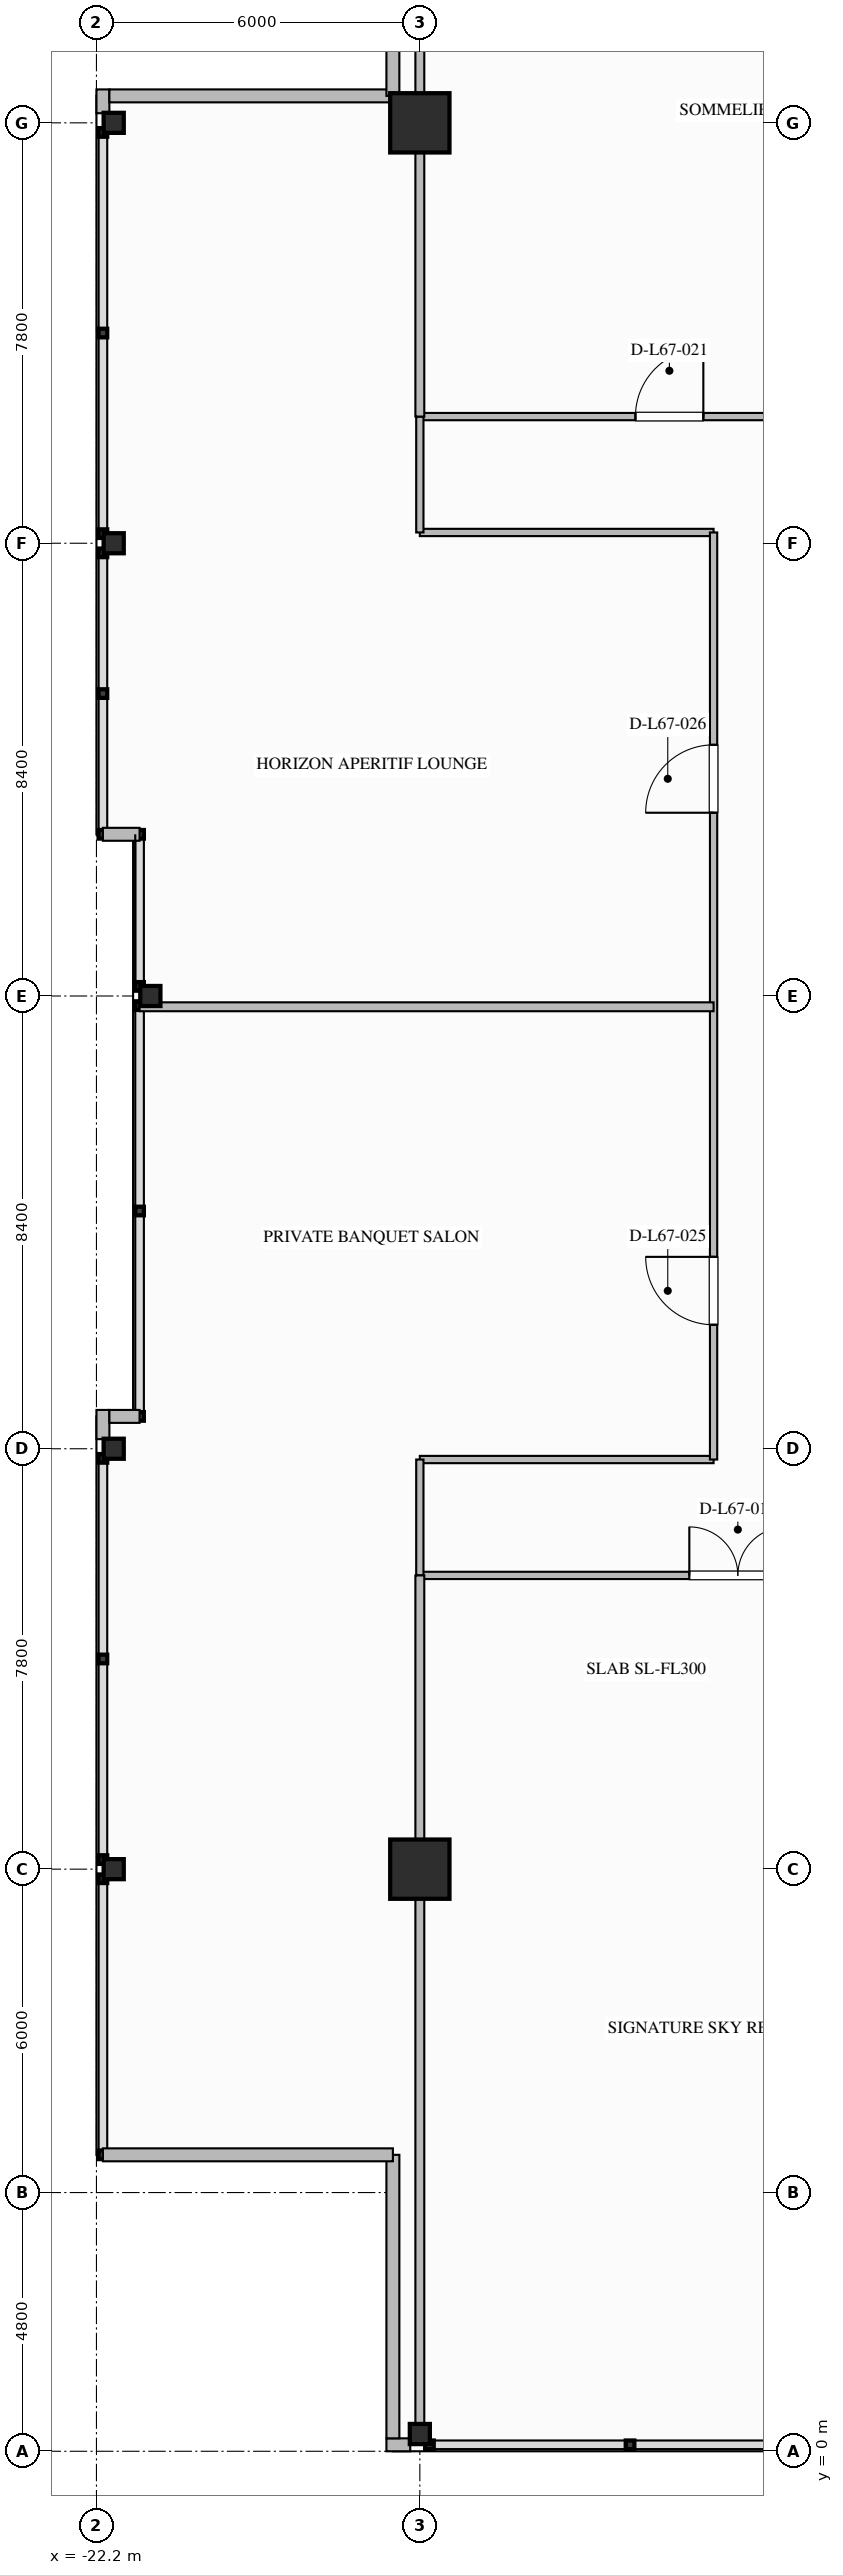
"""IFC4 building model, lengths in metres.
Left out: names, types, materials, properties, quantities, classifications, styles, units other than length and angle.
Written with IfcOpenShell. Run it as: python <this file> out.ifc"""

import sys

from ifc_helpers import new_model, si_unit, direction, frame, frame_2d, origin, origin_2d, place, context, subcontext, project, spatial, rectangle, i_section, extrude, element, fill, save


model = new_model("IFC4")
c1 = context("Model", 3, precision=1e-05, world=origin(), true_north=direction((0.0, 1.0)))
c2 = subcontext(c1, "Body", "Model", "MODEL_VIEW")
j1 = project(units=[si_unit("LENGTHUNIT", "METRE"), si_unit("PLANEANGLEUNIT", "RADIAN")], contexts=[c1])
p1 = place(None, origin())
s1 = spatial("IfcSite", under=j1, at=p1, CompositionType="ELEMENT")
p2 = place(p1, origin())
s2 = spatial("IfcBuilding", under=s1, at=p2, CompositionType="ELEMENT")
p3 = place(p2, frame((0.0, 0.0, 255.5)))
s3 = spatial("IfcBuildingStorey", under=s2, at=p3, CompositionType="ELEMENT", Elevation=255.5)
for number, where, z_axis, x_axis in (
    (1, (-16.2, 10.8, 0.0), (0.0, 0.0, 1.0), (1.0, 0.0, 0.0)),
    (2, (-16.2, 43.2, 0.0), (0.0, 0.0, 1.0), (1.0, 0.0, 0.0)),
):
    element("IfcColumn", number, at=place(p3, frame(where, z_axis=z_axis, x_axis=x_axis)), inside=s3, PredefinedType="COLUMN", context=c2, shape_type="SweptSolid", body=[
        extrude(rectangle(XDim=1.1, YDim=1.1, at=origin_2d()), origin(), (0.0, 0.0, 1.0), 4.5),
    ])
for number, where, z_axis, x_axis in (
    (3, (-21.88, 10.8, 0.0), (0.0, 0.0, 1.0), (1.0, 0.0, 0.0)),
    (4, (-21.88, 18.6, 0.0), (0.0, 0.0, 1.0), (1.0, 0.0, 0.0)),
    (5, (-21.2, 27.0, 0.0), (0.0, 0.0, 1.0), (1.0, 0.0, 0.0)),
    (6, (-21.88, 35.4, 0.0), (0.0, 0.0, 1.0), (1.0, 0.0, 0.0)),
    (7, (-21.88, 43.2, 0.0), (0.0, 0.0, 1.0), (1.0, 0.0, 0.0)),
    (8, (-16.2, 0.32, 0.0), (0.0, 0.0, 1.0), (0.0, 1.0, 0.0)),
):
    element("IfcColumn", number, at=place(p3, frame(where, z_axis=z_axis, x_axis=x_axis)), inside=s3, PredefinedType="COLUMN", context=c2, shape_type="SweptSolid", body=[
        extrude(i_section(OverallWidth=0.374, OverallDepth=0.372, WebThickness=0.016, FlangeThickness=0.026, FilletRadius=0.025, at=origin_2d()), origin(), (0.0, 0.0, 1.0), 4.497),
    ])
p4 = place(p3, frame((-22.08, 18.778, 0.0), z_axis=(0.0, 0.0, 1.0), x_axis=(0.0, 1.0, 0.0)))
e9 = element("IfcWall", 9, at=p4, inside=s3, PredefinedType="STANDARD", context=c2, shape_type="SweptSolid", body=[
    extrude(rectangle(XDim=0.542, YDim=0.24, at=frame_2d((0.271, 0.0))), origin(), (0.0, 0.0, 1.0), 4.18),
])
for number, where, z_axis, x_axis in (
    (10, (-22.08, 43.378, 0.0), (0.0, 0.0, 1.0), (0.0, 1.0, 0.0)),
    (11, (-16.378, 0.12, 0.0), (0.0, 0.0, 1.0), (-1.0, 0.0, 0.0)),
):
    element("IfcWall", number, at=place(p3, frame(where, z_axis=z_axis, x_axis=x_axis)), inside=s3, PredefinedType="STANDARD", context=c2, shape_type="SweptSolid", body=[
        extrude(rectangle(XDim=0.442, YDim=0.24, at=frame_2d((0.221, 0.0))), origin(), (0.0, 0.0, 1.0), 4.18),
    ])
p5 = place(p3, frame((-16.7, 0.24, 0.0), z_axis=(0.0, 0.0, 1.0), x_axis=(0.0, 1.0, 0.0)))
e12 = element("IfcWall", 12, at=p5, inside=s3, PredefinedType="STANDARD", context=c2, shape_type="SweptSolid", body=[
    extrude(rectangle(XDim=5.26, YDim=0.24, at=frame_2d((2.63, 0.0))), origin(), (0.0, 0.0, 1.0), 4.18),
])
p6 = place(p3, frame((-16.7, 5.5, 0.0), z_axis=(0.0, 0.0, 1.0), x_axis=(-1.0, 0.0, 0.0)))
e13 = element("IfcWall", 13, at=p6, inside=s3, PredefinedType="STANDARD", context=c2, shape_type="SweptSolid", body=[
    extrude(rectangle(XDim=5.38, YDim=0.24, at=frame_2d((2.69, 0.0))), origin(), (0.0, 0.0, 1.0), 4.18),
])
for number, where, z_axis, x_axis in (
    (14, (-21.96, 43.7, 0.0), (0.0, 0.0, 1.0), (1.0, 0.0, 0.0)),
    (15, (-16.7, 43.7, 0.0), (0.0, 0.0, 1.0), (0.0, 1.0, 0.0)),
):
    element("IfcWall", number, at=place(p3, frame(where, z_axis=z_axis, x_axis=x_axis)), inside=s3, PredefinedType="STANDARD", context=c2, shape_type="SweptSolid", body=[
        extrude(rectangle(XDim=5.26, YDim=0.24, at=frame_2d((2.63, 0.0))), origin(), (0.0, 0.0, 1.0), 4.18),
    ])
p7 = place(p3, frame((-21.96, 19.2, 0.0), z_axis=(0.0, 0.0, 1.0), x_axis=(1.0, 0.0, 0.0)))
e16 = element("IfcWall", 16, at=p7, inside=s3, PredefinedType="STANDARD", context=c2, shape_type="SweptSolid", body=[
    extrude(rectangle(XDim=0.56, YDim=0.24, at=frame_2d((0.28, 0.0))), origin(), (0.0, 0.0, 1.0), 4.18),
])
p8 = place(p3, frame((-21.4, 30.0, 0.0), z_axis=(0.0, 0.0, 1.0), x_axis=(-1.0, 0.0, 0.0)))
e17 = element("IfcWall", 17, at=p8, inside=s3, PredefinedType="STANDARD", context=c2, shape_type="SweptSolid", body=[
    extrude(rectangle(XDim=0.68, YDim=0.24, at=frame_2d((0.34, 0.0))), origin(), (0.0, 0.0, 1.0), 4.18),
])
p9 = place(p3, frame((-16.2, 16.25, 0.0), z_axis=(0.0, 0.0, 1.0), x_axis=(1.0, 0.0, 0.0)))
e18 = element("IfcWall", 18, at=p9, inside=s3, PredefinedType="PARTITIONING", context=c2, shape_type="SweptSolid", body=[
    extrude(rectangle(XDim=32.4, YDim=0.135, at=frame_2d((16.2, 0.0))), origin(), (0.0, 0.0, 1.0), 4.18),
])
p10 = place(p9, frame((5.0, 0.0, 0.0)))
e19 = element("IfcOpeningElement", 19, at=p10, cuts=e18, PredefinedType="OPENING", context=c2, shape_type="SweptSolid", body=[
    extrude(rectangle(XDim=1.8, YDim=2.35, at=frame_2d((0.9, 1.175))), frame((0.0, 0.077, 0.0), z_axis=(0.0, -1.0, 0.0), x_axis=(1.0, 0.0, 0.0)), (0.0, 0.0, 1.0), 0.155),
])
p11 = place(p9, frame((23.0, 0.0, 0.0)))
e20 = element("IfcOpeningElement", 20, at=p11, cuts=e18, PredefinedType="OPENING", context=c2, shape_type="SweptSolid", body=[
    extrude(rectangle(XDim=1.8, YDim=2.35, at=frame_2d((0.9, 1.175))), frame((0.0, 0.077, 0.0), z_axis=(0.0, -1.0, 0.0), x_axis=(1.0, 0.0, 0.0)), (0.0, 0.0, 1.0), 0.155),
])
p12 = place(p3, frame((-16.2, 37.75, 0.0), z_axis=(0.0, 0.0, 1.0), x_axis=(1.0, 0.0, 0.0)))
e21 = element("IfcWall", 21, at=p12, inside=s3, PredefinedType="PARTITIONING", context=c2, shape_type="SweptSolid", body=[
    extrude(rectangle(XDim=32.4, YDim=0.135, at=frame_2d((16.2, 0.0))), origin(), (0.0, 0.0, 1.0), 4.18),
])
p13 = place(p12, frame((4.0, 0.0, 0.0)))
e22 = element("IfcOpeningElement", 22, at=p13, cuts=e21, PredefinedType="OPENING", context=c2, shape_type="SweptSolid", body=[
    extrude(rectangle(XDim=1.26, YDim=2.2, at=frame_2d((0.63, 1.1))), frame((0.0, 0.077, 0.0), z_axis=(0.0, -1.0, 0.0), x_axis=(1.0, 0.0, 0.0)), (0.0, 0.0, 1.0), 0.155),
])
p14 = place(p12, frame((16.9, 0.0, 0.0)))
e23 = element("IfcOpeningElement", 23, at=p14, cuts=e21, PredefinedType="OPENING", context=c2, shape_type="SweptSolid", body=[
    extrude(rectangle(XDim=1.26, YDim=2.2, at=frame_2d((0.63, 1.1))), frame((0.0, 0.077, 0.0), z_axis=(0.0, -1.0, 0.0), x_axis=(1.0, 0.0, 0.0)), (0.0, 0.0, 1.0), 0.155),
])
p15 = place(p12, frame((25.5, 0.0, 0.0)))
e24 = element("IfcOpeningElement", 24, at=p15, cuts=e21, PredefinedType="OPENING", context=c2, shape_type="SweptSolid", body=[
    extrude(rectangle(XDim=0.92, YDim=2.1, at=frame_2d((0.46, 1.05))), frame((0.0, 0.077, 0.0), z_axis=(0.0, -1.0, 0.0), x_axis=(1.0, 0.0, 0.0)), (0.0, 0.0, 1.0), 0.155),
])
p16 = place(p12, frame((29.7, 0.0, 0.0)))
e25 = element("IfcOpeningElement", 25, at=p16, cuts=e21, PredefinedType="OPENING", context=c2, shape_type="SweptSolid", body=[
    extrude(rectangle(XDim=0.98, YDim=2.1, at=frame_2d((0.49, 1.05))), frame((0.0, 0.077, 0.0), z_axis=(0.0, -1.0, 0.0), x_axis=(1.0, 0.0, 0.0)), (0.0, 0.0, 1.0), 0.155),
])
for number, where, z_axis, x_axis in (
    (26, (-16.2, 18.4, 0.0), (0.0, 0.0, 1.0), (1.0, 0.0, 0.0)),
    (27, (-16.2, 35.6, 0.0), (0.0, 0.0, 1.0), (1.0, 0.0, 0.0)),
):
    element("IfcWall", number, at=place(p3, frame(where, z_axis=z_axis, x_axis=x_axis)), inside=s3, PredefinedType="PARTITIONING", context=c2, shape_type="SweptSolid", body=[
        extrude(rectangle(XDim=5.45, YDim=0.135, at=frame_2d((2.725, 0.0))), origin(), (0.0, 0.0, 1.0), 3.557),
    ])
p17 = place(p3, frame((-10.75, 18.4, 0.0), z_axis=(0.0, 0.0, 1.0), x_axis=(0.0, 1.0, 0.0)))
e28 = element("IfcWall", 28, at=p17, inside=s3, PredefinedType="PARTITIONING", context=c2, shape_type="SweptSolid", body=[
    extrude(rectangle(XDim=17.2, YDim=0.135, at=frame_2d((8.6, 0.0))), origin(), (0.0, 0.0, 1.0), 4.18),
])
p18 = place(p17, frame((2.5, 0.0, 0.0)))
e29 = element("IfcOpeningElement", 29, at=p18, cuts=e28, PredefinedType="OPENING", context=c2, shape_type="SweptSolid", body=[
    extrude(rectangle(XDim=1.26, YDim=2.2, at=frame_2d((0.63, 1.1))), frame((0.0, 0.077, 0.0), z_axis=(0.0, -1.0, 0.0), x_axis=(1.0, 0.0, 0.0)), (0.0, 0.0, 1.0), 0.155),
])
p19 = place(p17, frame((12.0, 0.0, 0.0)))
e30 = element("IfcOpeningElement", 30, at=p19, cuts=e28, PredefinedType="OPENING", context=c2, shape_type="SweptSolid", body=[
    extrude(rectangle(XDim=1.26, YDim=2.2, at=frame_2d((0.63, 1.1))), frame((0.0, 0.077, 0.0), z_axis=(0.0, -1.0, 0.0), x_axis=(1.0, 0.0, 0.0)), (0.0, 0.0, 1.0), 0.155),
])
for number, where, z_axis, x_axis in (
    (31, (-16.2, 16.25, 0.0), (0.0, 0.0, 1.0), (0.0, 1.0, 0.0)),
    (32, (-16.2, 35.6, 0.0), (0.0, 0.0, 1.0), (0.0, 1.0, 0.0)),
):
    element("IfcWall", number, at=place(p3, frame(where, z_axis=z_axis, x_axis=x_axis)), inside=s3, PredefinedType="PARTITIONING", context=c2, shape_type="SweptSolid", body=[
        extrude(rectangle(XDim=2.15, YDim=0.135, at=frame_2d((1.075, 0.0))), origin(), (0.0, 0.0, 1.0), 3.554),
    ])
p20 = place(p3, frame((-16.2, 0.12, 0.0), z_axis=(0.0, 0.0, 1.0), x_axis=(0.0, 1.0, 0.0)))
e33 = element("IfcWall", 33, at=p20, inside=s3, PredefinedType="PARTITIONING", context=c2, shape_type="SweptSolid", body=[
    extrude(rectangle(XDim=16.13, YDim=0.165, at=frame_2d((8.065, 0.0))), origin(), (0.0, 0.0, 1.0), 3.554),
])
p21 = place(p3, frame((-16.2, 37.75, 0.0), z_axis=(0.0, 0.0, 1.0), x_axis=(0.0, 1.0, 0.0)))
e34 = element("IfcWall", 34, at=p21, inside=s3, PredefinedType="PARTITIONING", context=c2, shape_type="SweptSolid", body=[
    extrude(rectangle(XDim=11.33, YDim=0.165, at=frame_2d((5.665, 0.0))), origin(), (0.0, 0.0, 1.0), 3.554),
])
p22 = place(p3, frame((-21.4, 26.8, 0.0), z_axis=(0.0, 0.0, 1.0), x_axis=(1.0, 0.0, 0.0)))
e35 = element("IfcWall", 35, at=p22, inside=s3, PredefinedType="PARTITIONING", context=c2, shape_type="SweptSolid", body=[
    extrude(rectangle(XDim=10.65, YDim=0.165, at=frame_2d((5.325, 0.0))), origin(), (0.0, 0.0, 1.0), 3.554),
])
p23 = place(p10, origin())
e36 = element("IfcDoor", 36, at=p23, inside=s3, OperationType="DOUBLE_DOOR_SINGLE_SWING", PredefinedType="DOOR", context=c2, shape_type="SweptSolid", body=[
    extrude(rectangle(XDim=1.8, YDim=2.35, at=frame_2d((0.9, 1.175))), frame((0.0, 0.025, 0.0), z_axis=(0.0, -1.0, 0.0), x_axis=(1.0, 0.0, 0.0)), (0.0, 0.0, 1.0), 0.05),
])
fill(e19, e36)
p24 = place(p13, origin())
e37 = element("IfcDoor", 37, at=p24, inside=s3, OperationType="SINGLE_SWING_RIGHT", PredefinedType="DOOR", context=c2, shape_type="SweptSolid", body=[
    extrude(rectangle(XDim=1.26, YDim=2.2, at=frame_2d((0.63, 1.1))), frame((0.0, 0.025, 0.0), z_axis=(0.0, -1.0, 0.0), x_axis=(1.0, 0.0, 0.0)), (0.0, 0.0, 1.0), 0.05),
])
fill(e22, e37)
p25 = place(p18, origin())
e38 = element("IfcDoor", 38, at=p25, inside=s3, OperationType="SINGLE_SWING_RIGHT", PredefinedType="DOOR", context=c2, shape_type="SweptSolid", body=[
    extrude(rectangle(XDim=1.26, YDim=2.2, at=frame_2d((0.63, 1.1))), frame((0.0, 0.025, 0.0), z_axis=(0.0, -1.0, 0.0), x_axis=(1.0, 0.0, 0.0)), (0.0, 0.0, 1.0), 0.05),
])
fill(e29, e38)
p26 = place(p19, origin())
e39 = element("IfcDoor", 39, at=p26, inside=s3, OperationType="SINGLE_SWING_LEFT", PredefinedType="DOOR", context=c2, shape_type="SweptSolid", body=[
    extrude(rectangle(XDim=1.26, YDim=2.2, at=frame_2d((0.63, 1.1))), frame((0.0, 0.025, 0.0), z_axis=(0.0, -1.0, 0.0), x_axis=(1.0, 0.0, 0.0)), (0.0, 0.0, 1.0), 0.05),
])
fill(e30, e39)
save(model, sys.argv[1])
